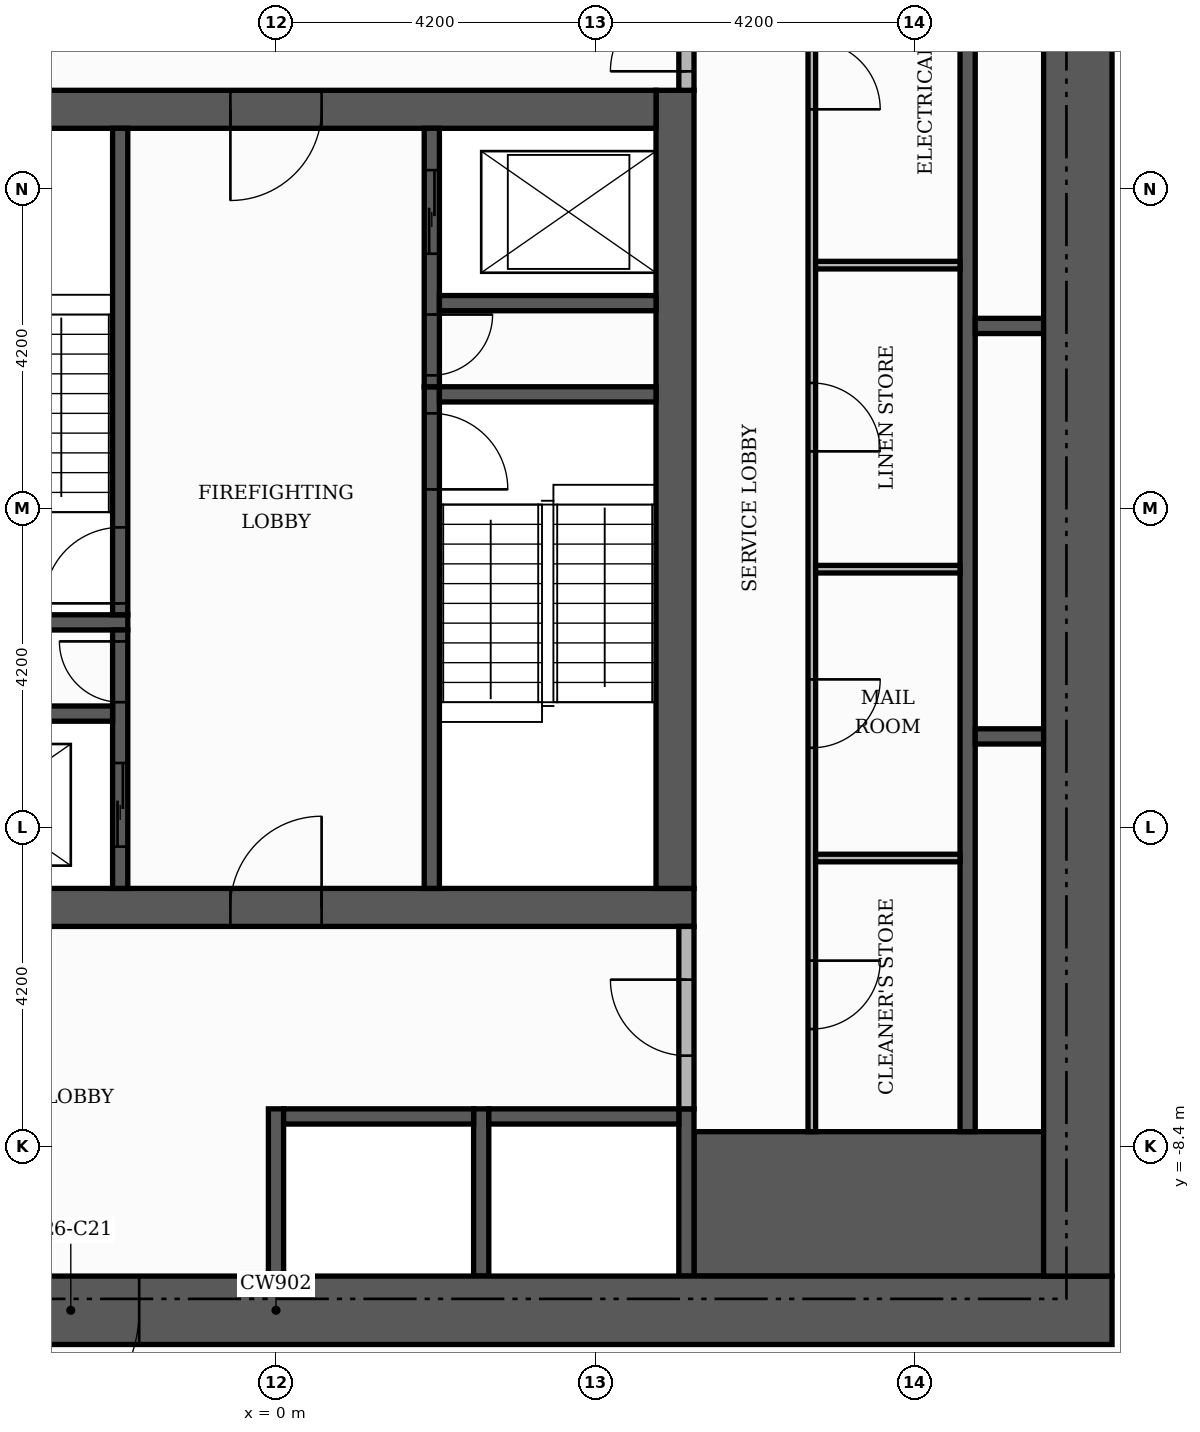
"""IFC4 building model, lengths in metres.
Left out: names, types, materials, properties, quantities, classifications, styles, units other than length and angle.
Written with IfcOpenShell. Run it as: python <this file> out.ifc"""

import sys

from ifc_helpers import new_model, si_unit, direction, frame, frame_2d, origin, place, context, subcontext, project, spatial, rectangle, extrude, element, fill, save


model = new_model("IFC4")
c1 = context("Model", 3, precision=1e-05, world=origin(), true_north=direction((0.0, 1.0)))
c2 = subcontext(c1, "Body", "Model", "MODEL_VIEW")
j1 = project(units=[si_unit("LENGTHUNIT", "METRE"), si_unit("PLANEANGLEUNIT", "RADIAN")], contexts=[c1])
p1 = place(None, origin())
s1 = spatial("IfcSite", under=j1, at=p1, CompositionType="ELEMENT")
p2 = place(p1, origin())
s2 = spatial("IfcBuilding", under=s1, at=p2, CompositionType="ELEMENT")
p3 = place(p2, frame((0.0, 0.0, 110.4)))
s3 = spatial("IfcBuildingStorey", under=s2, at=p3, CompositionType="ELEMENT", Elevation=110.4)
p4 = place(p3, frame((-5.5, -5.25, 0.0), z_axis=(0.0, 0.0, 1.0), x_axis=(1.0, 0.0, 0.0)))
e1 = element("IfcWall", 1, at=p4, inside=s3, PredefinedType="SHEAR", context=c2, shape_type="SweptSolid", body=[
    extrude(rectangle(XDim=11.0, YDim=0.5, at=frame_2d((5.5, 0.0))), origin(), (0.0, 0.0, 1.0), 3.48),
])
p5 = place(p4, frame((4.9, 0.0, 0.0)))
e2 = element("IfcOpeningElement", 2, at=p5, cuts=e1, PredefinedType="OPENING", context=c2, shape_type="SweptSolid", body=[
    extrude(rectangle(XDim=1.2, YDim=2.1, at=frame_2d((0.6, 1.05))), frame((0.0, 0.26, 0.0), z_axis=(0.0, -1.0, 0.0), x_axis=(1.0, 0.0, 0.0)), (0.0, 0.0, 1.0), 0.52),
])
p6 = place(p3, frame((5.25, -5.0, 0.0), z_axis=(0.0, 0.0, 1.0), x_axis=(0.0, 1.0, 0.0)))
e3 = element("IfcWall", 3, at=p6, inside=s3, PredefinedType="SHEAR", context=c2, shape_type="SweptSolid", body=[
    extrude(rectangle(XDim=10.5, YDim=0.5, at=frame_2d((5.25, 0.0))), origin(), (0.0, 0.0, 1.0), 3.48),
])
p7 = place(p3, frame((-5.0, 5.25, 0.0), z_axis=(0.0, 0.0, 1.0), x_axis=(1.0, 0.0, 0.0)))
e4 = element("IfcWall", 4, at=p7, inside=s3, PredefinedType="SHEAR", context=c2, shape_type="SweptSolid", body=[
    extrude(rectangle(XDim=10.0, YDim=0.5, at=frame_2d((5.0, 0.0))), origin(), (0.0, 0.0, 1.0), 3.48),
])
p8 = place(p7, frame((4.4, 0.0, 0.0)))
e5 = element("IfcOpeningElement", 5, at=p8, cuts=e4, PredefinedType="OPENING", context=c2, shape_type="SweptSolid", body=[
    extrude(rectangle(XDim=1.2, YDim=2.1, at=frame_2d((0.6, 1.05))), frame((0.0, 0.26, 0.0), z_axis=(0.0, -1.0, 0.0), x_axis=(1.0, 0.0, 0.0)), (0.0, 0.0, 1.0), 0.52),
])
p9 = place(p3, frame((5.5, -9.15, 0.0), z_axis=(0.0, 0.0, 1.0), x_axis=(1.0, 0.0, 0.0)))
e6 = element("IfcWall", 6, at=p9, inside=s3, PredefinedType="SHEAR", context=c2, shape_type="SweptSolid", body=[
    extrude(rectangle(XDim=4.6, YDim=1.9, at=frame_2d((2.3, 0.0))), origin(), (0.0, 0.0, 1.0), 3.48),
])
p10 = place(p3, frame((2.05, -5.0, 0.0), z_axis=(0.0, 0.0, 1.0), x_axis=(0.0, 1.0, 0.0)))
e7 = element("IfcWall", 7, at=p10, inside=s3, PredefinedType="SHEAR", context=c2, shape_type="SweptSolid", body=[
    extrude(rectangle(XDim=6.6, YDim=0.2, at=frame_2d((3.3, 0.0))), origin(), (0.0, 0.0, 1.0), 3.48),
])
p11 = place(p10, frame((5.25, 0.0, 0.0)))
e8 = element("IfcOpeningElement", 8, at=p11, cuts=e7, PredefinedType="OPENING", context=c2, shape_type="SweptSolid", body=[
    extrude(rectangle(XDim=1.0, YDim=2.1, at=frame_2d((0.5, 1.05))), frame((0.0, 0.11, 0.0), z_axis=(0.0, -1.0, 0.0), x_axis=(1.0, 0.0, 0.0)), (0.0, 0.0, 1.0), 0.22),
])
p12 = place(p3, frame((-5.0, -1.5, 0.0), z_axis=(0.0, 0.0, 1.0), x_axis=(1.0, 0.0, 0.0)))
e9 = element("IfcWall", 9, at=p12, inside=s3, PredefinedType="SHEAR", context=c2, shape_type="SweptSolid", body=[
    extrude(rectangle(XDim=3.05, YDim=0.2, at=frame_2d((1.525, 0.0))), origin(), (0.0, 0.0, 1.0), 3.48),
])
p13 = place(p3, frame((-2.05, -1.4, 0.0), z_axis=(0.0, 0.0, 1.0), x_axis=(0.0, 1.0, 0.0)))
e10 = element("IfcWall", 10, at=p13, inside=s3, PredefinedType="SHEAR", context=c2, shape_type="SweptSolid", body=[
    extrude(rectangle(XDim=6.4, YDim=0.2, at=frame_2d((3.2, 0.0))), origin(), (0.0, 0.0, 1.0), 3.48),
])
p14 = place(p13, frame((0.15, 0.0, 0.0)))
e11 = element("IfcOpeningElement", 11, at=p14, cuts=e10, PredefinedType="OPENING", context=c2, shape_type="SweptSolid", body=[
    extrude(rectangle(XDim=1.0, YDim=2.1, at=frame_2d((0.5, 1.05))), frame((0.0, 0.11, 0.0), z_axis=(0.0, -1.0, 0.0), x_axis=(1.0, 0.0, 0.0)), (0.0, 0.0, 1.0), 0.22),
])
p15 = place(p3, frame((2.15, 1.5, 0.0), z_axis=(0.0, 0.0, 1.0), x_axis=(1.0, 0.0, 0.0)))
e12 = element("IfcWall", 12, at=p15, inside=s3, PredefinedType="SHEAR", context=c2, shape_type="SweptSolid", body=[
    extrude(rectangle(XDim=2.85, YDim=0.2, at=frame_2d((1.425, 0.0))), origin(), (0.0, 0.0, 1.0), 3.48),
])
for number, where, z_axis, x_axis in (
    (13, (0.0, -10.1, 0.0), (0.0, 0.0, 1.0), (0.0, 1.0, 0.0)),
    (14, (2.7, -10.1, 0.0), (0.0, 0.0, 1.0), (0.0, 1.0, 0.0)),
    (15, (5.4, -10.1, 0.0), (0.0, 0.0, 1.0), (0.0, 1.0, 0.0)),
):
    element("IfcWall", number, at=place(p3, frame(where, z_axis=z_axis, x_axis=x_axis)), inside=s3, PredefinedType="SHEAR", context=c2, shape_type="SweptSolid", body=[
        extrude(rectangle(XDim=2.2, YDim=0.2, at=frame_2d((1.1, 0.0))), origin(), (0.0, 0.0, 1.0), 3.48),
    ])
p16 = place(p3, frame((9.1, -8.2, 0.0), z_axis=(0.0, 0.0, 1.0), x_axis=(0.0, 1.0, 0.0)))
e16 = element("IfcWall", 16, at=p16, inside=s3, PredefinedType="SHEAR", context=c2, shape_type="SweptSolid", body=[
    extrude(rectangle(XDim=16.4, YDim=0.2, at=frame_2d((8.2, 0.0))), origin(), (0.0, 0.0, 1.0), 3.48),
])
for number, where, z_axis, x_axis in (
    (17, (0.1, -8.0, 0.0), (0.0, 0.0, 1.0), (1.0, 0.0, 0.0)),
    (18, (2.8, -8.0, 0.0), (0.0, 0.0, 1.0), (1.0, 0.0, 0.0)),
):
    element("IfcWall", number, at=place(p3, frame(where, z_axis=z_axis, x_axis=x_axis)), inside=s3, PredefinedType="SHEAR", context=c2, shape_type="SweptSolid", body=[
        extrude(rectangle(XDim=2.5, YDim=0.2, at=frame_2d((1.25, 0.0))), origin(), (0.0, 0.0, 1.0), 3.48),
    ])
p17 = place(p3, frame((-2.05, -5.0, 0.0), z_axis=(0.0, 0.0, 1.0), x_axis=(0.0, 1.0, 0.0)))
e19 = element("IfcWall", 19, at=p17, inside=s3, PredefinedType="SHEAR", context=c2, shape_type="SweptSolid", body=[
    extrude(rectangle(XDim=3.4, YDim=0.2, at=frame_2d((1.7, 0.0))), origin(), (0.0, 0.0, 1.0), 3.48),
])
p18 = place(p17, frame((0.55, 0.0, 0.0)))
e20 = element("IfcOpeningElement", 20, at=p18, cuts=e19, PredefinedType="OPENING", context=c2, shape_type="SweptSolid", body=[
    extrude(rectangle(XDim=1.1, YDim=2.1, at=frame_2d((0.55, 1.05))), frame((0.0, 0.11, 0.0), z_axis=(0.0, -1.0, 0.0), x_axis=(1.0, 0.0, 0.0)), (0.0, 0.0, 1.0), 0.22),
])
p19 = place(p17, frame((2.45, 0.0, 0.0)))
e21 = element("IfcOpeningElement", 21, at=p19, cuts=e19, PredefinedType="OPENING", context=c2, shape_type="SweptSolid", body=[
    extrude(rectangle(XDim=0.8, YDim=2.1, at=frame_2d((0.4, 1.05))), frame((0.0, 0.11, 0.0), z_axis=(0.0, -1.0, 0.0), x_axis=(1.0, 0.0, 0.0)), (0.0, 0.0, 1.0), 0.22),
])
p20 = place(p3, frame((9.2, -3.0, 0.0), z_axis=(0.0, 0.0, 1.0), x_axis=(1.0, 0.0, 0.0)))
e22 = element("IfcWall", 22, at=p20, inside=s3, PredefinedType="SHEAR", context=c2, shape_type="SweptSolid", body=[
    extrude(rectangle(XDim=0.9, YDim=0.2, at=frame_2d((0.45, 0.0))), origin(), (0.0, 0.0, 1.0), 3.48),
])
p21 = place(p3, frame((-5.0, -2.7, 0.0), z_axis=(0.0, 0.0, 1.0), x_axis=(1.0, 0.0, 0.0)))
e23 = element("IfcWall", 23, at=p21, inside=s3, PredefinedType="SHEAR", context=c2, shape_type="SweptSolid", body=[
    extrude(rectangle(XDim=2.85, YDim=0.2, at=frame_2d((1.425, 0.0))), origin(), (0.0, 0.0, 1.0), 3.48),
])
p22 = place(p3, frame((2.05, 1.6, 0.0), z_axis=(0.0, 0.0, 1.0), x_axis=(0.0, 1.0, 0.0)))
e24 = element("IfcWall", 24, at=p22, inside=s3, PredefinedType="SHEAR", context=c2, shape_type="SweptSolid", body=[
    extrude(rectangle(XDim=3.4, YDim=0.2, at=frame_2d((1.7, 0.0))), origin(), (0.0, 0.0, 1.0), 3.48),
])
p23 = place(p22, frame((1.75, 0.0, 0.0)))
e25 = element("IfcOpeningElement", 25, at=p23, cuts=e24, PredefinedType="OPENING", context=c2, shape_type="SweptSolid", body=[
    extrude(rectangle(XDim=1.1, YDim=2.1, at=frame_2d((0.55, 1.05))), frame((0.0, 0.11, 0.0), z_axis=(0.0, -1.0, 0.0), x_axis=(1.0, 0.0, 0.0)), (0.0, 0.0, 1.0), 0.22),
])
p24 = place(p22, frame((0.15, 0.0, 0.0)))
e26 = element("IfcOpeningElement", 26, at=p24, cuts=e24, PredefinedType="OPENING", context=c2, shape_type="SweptSolid", body=[
    extrude(rectangle(XDim=0.8, YDim=2.1, at=frame_2d((0.4, 1.05))), frame((0.0, 0.11, 0.0), z_axis=(0.0, -1.0, 0.0), x_axis=(1.0, 0.0, 0.0)), (0.0, 0.0, 1.0), 0.22),
])
p25 = place(p3, frame((9.2, 2.4, 0.0), z_axis=(0.0, 0.0, 1.0), x_axis=(1.0, 0.0, 0.0)))
e27 = element("IfcWall", 27, at=p25, inside=s3, PredefinedType="SHEAR", context=c2, shape_type="SweptSolid", body=[
    extrude(rectangle(XDim=0.9, YDim=0.2, at=frame_2d((0.45, 0.0))), origin(), (0.0, 0.0, 1.0), 3.48),
])
p26 = place(p3, frame((2.15, 2.7, 0.0), z_axis=(0.0, 0.0, 1.0), x_axis=(1.0, 0.0, 0.0)))
e28 = element("IfcWall", 28, at=p26, inside=s3, PredefinedType="SHEAR", context=c2, shape_type="SweptSolid", body=[
    extrude(rectangle(XDim=2.85, YDim=0.2, at=frame_2d((1.425, 0.0))), origin(), (0.0, 0.0, 1.0), 3.48),
])
p27 = place(p3, frame((-11.0, -10.55, 0.0), z_axis=(0.0, 0.0, 1.0), x_axis=(1.0, 0.0, 0.0)))
e29 = element("IfcWall", 29, at=p27, inside=s3, PredefinedType="SHEAR", context=c2, shape_type="SweptSolid", body=[
    extrude(rectangle(XDim=22.0, YDim=0.9, at=frame_2d((11.0, 0.0))), origin(), (0.0, 0.0, 1.0), 3.48),
])
p28 = place(p27, frame((7.4, 0.0, 0.0)))
e30 = element("IfcOpeningElement", 30, at=p28, cuts=e29, PredefinedType="OPENING", context=c2, shape_type="SweptSolid", body=[
    extrude(rectangle(XDim=1.8, YDim=2.2, at=frame_2d((0.9, 1.1))), frame((0.0, 0.46, 0.0), z_axis=(0.0, -1.0, 0.0), x_axis=(1.0, 0.0, 0.0)), (0.0, 0.0, 1.0), 0.92),
])
p29 = place(p3, frame((10.55, -10.1, 0.0), z_axis=(0.0, 0.0, 1.0), x_axis=(0.0, 1.0, 0.0)))
e31 = element("IfcWall", 31, at=p29, inside=s3, PredefinedType="SHEAR", context=c2, shape_type="SweptSolid", body=[
    extrude(rectangle(XDim=20.2, YDim=0.9, at=frame_2d((10.1, 0.0))), origin(), (0.0, 0.0, 1.0), 3.48),
])
p30 = place(p3, frame((7.05, -8.2, 0.0), z_axis=(0.0, 0.0, 1.0), x_axis=(0.0, 1.0, 0.0)))
e32 = element("IfcWall", 32, at=p30, inside=s3, PredefinedType="PARTITIONING", context=c2, shape_type="SweptSolid", body=[
    extrude(rectangle(XDim=16.4, YDim=0.1, at=frame_2d((8.2, 0.0))), origin(), (0.0, 0.0, 1.0), 3.48),
])
p31 = place(p30, frame((1.35, 0.0, 0.0)))
e33 = element("IfcOpeningElement", 33, at=p31, cuts=e32, PredefinedType="OPENING", context=c2, shape_type="SweptSolid", body=[
    extrude(rectangle(XDim=0.9, YDim=2.1, at=frame_2d((0.45, 1.05))), frame((0.0, 0.06, 0.0), z_axis=(0.0, -1.0, 0.0), x_axis=(1.0, 0.0, 0.0)), (0.0, 0.0, 1.0), 0.12),
])
p32 = place(p30, frame((5.05, 0.0, 0.0)))
e34 = element("IfcOpeningElement", 34, at=p32, cuts=e32, PredefinedType="OPENING", context=c2, shape_type="SweptSolid", body=[
    extrude(rectangle(XDim=0.9, YDim=2.1, at=frame_2d((0.45, 1.05))), frame((0.0, 0.06, 0.0), z_axis=(0.0, -1.0, 0.0), x_axis=(1.0, 0.0, 0.0)), (0.0, 0.0, 1.0), 0.12),
])
p33 = place(p30, frame((8.95, 0.0, 0.0)))
e35 = element("IfcOpeningElement", 35, at=p33, cuts=e32, PredefinedType="OPENING", context=c2, shape_type="SweptSolid", body=[
    extrude(rectangle(XDim=0.9, YDim=2.1, at=frame_2d((0.45, 1.05))), frame((0.0, 0.06, 0.0), z_axis=(0.0, -1.0, 0.0), x_axis=(1.0, 0.0, 0.0)), (0.0, 0.0, 1.0), 0.12),
])
p34 = place(p30, frame((13.45, 0.0, 0.0)))
e36 = element("IfcOpeningElement", 36, at=p34, cuts=e32, PredefinedType="OPENING", context=c2, shape_type="SweptSolid", body=[
    extrude(rectangle(XDim=0.9, YDim=2.1, at=frame_2d((0.45, 1.05))), frame((0.0, 0.06, 0.0), z_axis=(0.0, -1.0, 0.0), x_axis=(1.0, 0.0, 0.0)), (0.0, 0.0, 1.0), 0.12),
])
p35 = place(p3, frame((5.4, -7.9, 0.0), z_axis=(0.0, 0.0, 1.0), x_axis=(0.0, 1.0, 0.0)))
e37 = element("IfcWall", 37, at=p35, inside=s3, PredefinedType="PARTITIONING", context=c2, shape_type="SweptSolid", body=[
    extrude(rectangle(XDim=2.4, YDim=0.2, at=frame_2d((1.2, 0.0))), origin(), (0.0, 0.0, 1.0), 3.48),
])
p36 = place(p35, frame((0.7, 0.0, 0.0)))
e38 = element("IfcOpeningElement", 38, at=p36, cuts=e37, PredefinedType="OPENING", context=c2, shape_type="SweptSolid", body=[
    extrude(rectangle(XDim=1.0, YDim=2.1, at=frame_2d((0.5, 1.05))), frame((0.0, 0.11, 0.0), z_axis=(0.0, -1.0, 0.0), x_axis=(1.0, 0.0, 0.0)), (0.0, 0.0, 1.0), 0.22),
])
for number, where, z_axis, x_axis in (
    (39, (7.1, -4.6, 0.0), (0.0, 0.0, 1.0), (1.0, 0.0, 0.0)),
    (40, (7.1, -0.8, 0.0), (0.0, 0.0, 1.0), (1.0, 0.0, 0.0)),
    (41, (7.1, 3.2, 0.0), (0.0, 0.0, 1.0), (1.0, 0.0, 0.0)),
):
    element("IfcWall", number, at=place(p3, frame(where, z_axis=z_axis, x_axis=x_axis)), inside=s3, PredefinedType="PARTITIONING", context=c2, shape_type="SweptSolid", body=[
        extrude(rectangle(XDim=1.9, YDim=0.1, at=frame_2d((0.95, 0.0))), origin(), (0.0, 0.0, 1.0), 3.48),
    ])
p37 = place(p3, frame((5.4, 5.5, 0.0), z_axis=(0.0, 0.0, 1.0), x_axis=(0.0, 1.0, 0.0)))
e42 = element("IfcWall", 42, at=p37, inside=s3, PredefinedType="PARTITIONING", context=c2, shape_type="SweptSolid", body=[
    extrude(rectangle(XDim=4.6, YDim=0.2, at=frame_2d((2.3, 0.0))), origin(), (0.0, 0.0, 1.0), 3.48),
])
p38 = place(p37, frame((0.25, 0.0, 0.0)))
e43 = element("IfcOpeningElement", 43, at=p38, cuts=e42, PredefinedType="OPENING", context=c2, shape_type="SweptSolid", body=[
    extrude(rectangle(XDim=1.0, YDim=2.1, at=frame_2d((0.5, 1.05))), frame((0.0, 0.11, 0.0), z_axis=(0.0, -1.0, 0.0), x_axis=(1.0, 0.0, 0.0)), (0.0, 0.0, 1.0), 0.22),
])
p39 = place(p23, origin())
e44 = element("IfcDoor", 44, at=p39, inside=s3, OperationType="SLIDING_TO_LEFT", PredefinedType="DOOR", context=c2, shape_type="SweptSolid", body=[
    extrude(rectangle(XDim=1.1, YDim=2.1, at=frame_2d((0.55, 1.05))), frame((0.0, 0.025, 0.0), z_axis=(0.0, -1.0, 0.0), x_axis=(1.0, 0.0, 0.0)), (0.0, 0.0, 1.0), 0.05),
])
fill(e25, e44)
p40 = place(p18, origin())
e45 = element("IfcDoor", 45, at=p40, inside=s3, OperationType="SLIDING_TO_LEFT", PredefinedType="DOOR", context=c2, shape_type="SweptSolid", body=[
    extrude(rectangle(XDim=1.1, YDim=2.1, at=frame_2d((0.55, 1.05))), frame((0.0, 0.025, 0.0), z_axis=(0.0, -1.0, 0.0), x_axis=(1.0, 0.0, 0.0)), (0.0, 0.0, 1.0), 0.05),
])
fill(e20, e45)
p41 = place(p14, origin())
e46 = element("IfcDoor", 46, at=p41, inside=s3, OperationType="SINGLE_SWING_LEFT", PredefinedType="DOOR", context=c2, shape_type="SweptSolid", body=[
    extrude(rectangle(XDim=1.0, YDim=2.1, at=frame_2d((0.5, 1.05))), frame((0.0, 0.025, 0.0), z_axis=(0.0, -1.0, 0.0), x_axis=(1.0, 0.0, 0.0)), (0.0, 0.0, 1.0), 0.05),
])
fill(e11, e46)
p42 = place(p11, frame((1.0, 0.0, 0.0), z_axis=(0.0, 0.0, 1.0), x_axis=(-1.0, 0.0, 0.0)))
e47 = element("IfcDoor", 47, at=p42, inside=s3, OperationType="SINGLE_SWING_LEFT", PredefinedType="DOOR", context=c2, shape_type="SweptSolid", body=[
    extrude(rectangle(XDim=1.0, YDim=2.1, at=frame_2d((0.5, 1.05))), frame((0.0, 0.025, 0.0), z_axis=(0.0, -1.0, 0.0), x_axis=(1.0, 0.0, 0.0)), (0.0, 0.0, 1.0), 0.05),
])
fill(e8, e47)
p43 = place(p24, frame((0.8, 0.0, 0.0), z_axis=(0.0, 0.0, 1.0), x_axis=(-1.0, 0.0, 0.0)))
e48 = element("IfcDoor", 48, at=p43, inside=s3, OperationType="SINGLE_SWING_RIGHT", PredefinedType="DOOR", context=c2, shape_type="SweptSolid", body=[
    extrude(rectangle(XDim=0.8, YDim=2.1, at=frame_2d((0.4, 1.05))), frame((0.0, 0.025, 0.0), z_axis=(0.0, -1.0, 0.0), x_axis=(1.0, 0.0, 0.0)), (0.0, 0.0, 1.0), 0.05),
])
fill(e26, e48)
p44 = place(p19, origin())
e49 = element("IfcDoor", 49, at=p44, inside=s3, OperationType="SINGLE_SWING_RIGHT", PredefinedType="DOOR", context=c2, shape_type="SweptSolid", body=[
    extrude(rectangle(XDim=0.8, YDim=2.1, at=frame_2d((0.4, 1.05))), frame((0.0, 0.025, 0.0), z_axis=(0.0, -1.0, 0.0), x_axis=(1.0, 0.0, 0.0)), (0.0, 0.0, 1.0), 0.05),
])
fill(e21, e49)
p45 = place(p8, frame((1.2, 0.0, 0.0), z_axis=(0.0, 0.0, 1.0), x_axis=(-1.0, 0.0, 0.0)))
e50 = element("IfcDoor", 50, at=p45, inside=s3, OperationType="SINGLE_SWING_LEFT", PredefinedType="DOOR", context=c2, shape_type="SweptSolid", body=[
    extrude(rectangle(XDim=1.2, YDim=2.1, at=frame_2d((0.6, 1.05))), frame((0.0, 0.025, 0.0), z_axis=(0.0, -1.0, 0.0), x_axis=(1.0, 0.0, 0.0)), (0.0, 0.0, 1.0), 0.05),
])
fill(e5, e50)
p46 = place(p5, origin())
e51 = element("IfcDoor", 51, at=p46, inside=s3, OperationType="SINGLE_SWING_RIGHT", PredefinedType="DOOR", context=c2, shape_type="SweptSolid", body=[
    extrude(rectangle(XDim=1.2, YDim=2.1, at=frame_2d((0.6, 1.05))), frame((0.0, 0.025, 0.0), z_axis=(0.0, -1.0, 0.0), x_axis=(1.0, 0.0, 0.0)), (0.0, 0.0, 1.0), 0.05),
])
fill(e2, e51)
p47 = place(p38, origin())
e52 = element("IfcDoor", 52, at=p47, inside=s3, OperationType="SINGLE_SWING_LEFT", PredefinedType="DOOR", context=c2, shape_type="SweptSolid", body=[
    extrude(rectangle(XDim=1.0, YDim=2.1, at=frame_2d((0.5, 1.05))), frame((0.0, 0.025, 0.0), z_axis=(0.0, -1.0, 0.0), x_axis=(1.0, 0.0, 0.0)), (0.0, 0.0, 1.0), 0.05),
])
fill(e43, e52)
p48 = place(p36, origin())
e53 = element("IfcDoor", 53, at=p48, inside=s3, OperationType="SINGLE_SWING_RIGHT", PredefinedType="DOOR", context=c2, shape_type="SweptSolid", body=[
    extrude(rectangle(XDim=1.0, YDim=2.1, at=frame_2d((0.5, 1.05))), frame((0.0, 0.025, 0.0), z_axis=(0.0, -1.0, 0.0), x_axis=(1.0, 0.0, 0.0)), (0.0, 0.0, 1.0), 0.05),
])
fill(e38, e53)
p49 = place(p28, frame((1.8, 0.0, 0.0), z_axis=(0.0, 0.0, 1.0), x_axis=(-1.0, 0.0, 0.0)))
e54 = element("IfcDoor", 54, at=p49, inside=s3, OperationType="DOUBLE_DOOR_SINGLE_SWING", PredefinedType="DOOR", context=c2, shape_type="SweptSolid", body=[
    extrude(rectangle(XDim=1.8, YDim=2.2, at=frame_2d((0.9, 1.1))), frame((0.0, 0.025, 0.0), z_axis=(0.0, -1.0, 0.0), x_axis=(1.0, 0.0, 0.0)), (0.0, 0.0, 1.0), 0.05),
])
fill(e30, e54)
p50 = place(p31, frame((0.9, 0.0, 0.0), z_axis=(0.0, 0.0, 1.0), x_axis=(-1.0, 0.0, 0.0)))
e55 = element("IfcDoor", 55, at=p50, inside=s3, OperationType="SINGLE_SWING_RIGHT", PredefinedType="DOOR", context=c2, shape_type="SweptSolid", body=[
    extrude(rectangle(XDim=0.9, YDim=2.1, at=frame_2d((0.45, 1.05))), frame((0.0, 0.025, 0.0), z_axis=(0.0, -1.0, 0.0), x_axis=(1.0, 0.0, 0.0)), (0.0, 0.0, 1.0), 0.05),
])
fill(e33, e55)
p51 = place(p32, frame((0.9, 0.0, 0.0), z_axis=(0.0, 0.0, 1.0), x_axis=(-1.0, 0.0, 0.0)))
e56 = element("IfcDoor", 56, at=p51, inside=s3, OperationType="SINGLE_SWING_RIGHT", PredefinedType="DOOR", context=c2, shape_type="SweptSolid", body=[
    extrude(rectangle(XDim=0.9, YDim=2.1, at=frame_2d((0.45, 1.05))), frame((0.0, 0.025, 0.0), z_axis=(0.0, -1.0, 0.0), x_axis=(1.0, 0.0, 0.0)), (0.0, 0.0, 1.0), 0.05),
])
fill(e34, e56)
p52 = place(p33, frame((0.9, 0.0, 0.0), z_axis=(0.0, 0.0, 1.0), x_axis=(-1.0, 0.0, 0.0)))
e57 = element("IfcDoor", 57, at=p52, inside=s3, OperationType="SINGLE_SWING_LEFT", PredefinedType="DOOR", context=c2, shape_type="SweptSolid", body=[
    extrude(rectangle(XDim=0.9, YDim=2.1, at=frame_2d((0.45, 1.05))), frame((0.0, 0.025, 0.0), z_axis=(0.0, -1.0, 0.0), x_axis=(1.0, 0.0, 0.0)), (0.0, 0.0, 1.0), 0.05),
])
fill(e35, e57)
p53 = place(p34, frame((0.9, 0.0, 0.0), z_axis=(0.0, 0.0, 1.0), x_axis=(-1.0, 0.0, 0.0)))
e58 = element("IfcDoor", 58, at=p53, inside=s3, OperationType="SINGLE_SWING_LEFT", PredefinedType="DOOR", context=c2, shape_type="SweptSolid", body=[
    extrude(rectangle(XDim=0.9, YDim=2.1, at=frame_2d((0.45, 1.05))), frame((0.0, 0.025, 0.0), z_axis=(0.0, -1.0, 0.0), x_axis=(1.0, 0.0, 0.0)), (0.0, 0.0, 1.0), 0.05),
])
fill(e36, e58)
save(model, sys.argv[1])
